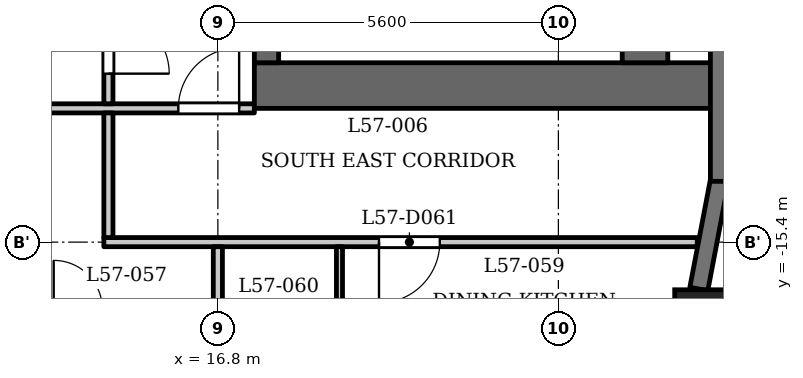
"""IFC4 building model, lengths in metres.
Left out: names, types, materials, properties, quantities, classifications, styles, units other than length and angle.
Written with IfcOpenShell. Run it as: python <this file> out.ifc"""

import sys

from ifc_helpers import new_model, si_unit, direction, frame, frame_2d, origin, origin_2d, place, context, subcontext, project, spatial, rectangle, extrude, element, fill, save


model = new_model("IFC4")
c1 = context("Model", 3, precision=1e-05, world=origin(), true_north=direction((0.0, 1.0)))
c2 = subcontext(c1, "Body", "Model", "MODEL_VIEW")
j1 = project(units=[si_unit("LENGTHUNIT", "METRE"), si_unit("PLANEANGLEUNIT", "RADIAN")], contexts=[c1])
p1 = place(None, origin())
s1 = spatial("IfcSite", under=j1, at=p1, CompositionType="ELEMENT")
p2 = place(p1, origin())
s2 = spatial("IfcBuilding", under=s1, at=p2, CompositionType="ELEMENT")
p3 = place(p2, frame((0.0, 0.0, 220.4)))
s3 = spatial("IfcBuildingStorey", under=s2, at=p3, CompositionType="ELEMENT", Elevation=220.4)
p4 = place(p3, frame((24.738, -16.609, 0.0), z_axis=(0.0, 0.0, 1.0), x_axis=(1.0, 0.0, 0.0)))
e1 = element("IfcColumn", 1, at=p4, inside=s3, PredefinedType="COLUMN", context=c2, shape_type="SweptSolid", body=[
    extrude(rectangle(XDim=0.85, YDim=0.85, at=origin_2d()), origin(), (0.0, 0.0, 1.0), 3.5),
])
p5 = place(p3, frame((24.709, -16.171, 0.0), z_axis=(0.0, 0.0, 1.0), x_axis=(0.187442908742, 0.982275499014, 0.0)))
e2 = element("IfcWall", 2, at=p5, inside=s3, PredefinedType="SOLIDWALL", context=c2, shape_type="SweptSolid", body=[
    extrude(rectangle(XDim=1.831, YDim=0.3, at=frame_2d((0.916, 0.0))), origin(), (0.0, 0.0, 1.0), 2.5),
])
p6 = place(p3, frame((25.05, -14.4, 0.0), z_axis=(0.0, 0.0, 1.0), x_axis=(0.0, 1.0, 0.0)))
e3 = element("IfcWall", 3, at=p6, inside=s3, PredefinedType="SOLIDWALL", context=c2, shape_type="SweptSolid", body=[
    extrude(rectangle(XDim=2.775, YDim=0.3, at=frame_2d((1.387, 0.0))), origin(), (0.0, 0.0, 1.0), 2.5),
])
p7 = place(p3, frame((17.4, -12.825, 0.0), z_axis=(0.0, 0.0, 1.0), x_axis=(1.0, 0.0, 0.0)))
e4 = element("IfcWall", 4, at=p7, inside=s3, PredefinedType="SHEAR", context=c2, shape_type="SweptSolid", body=[
    extrude(rectangle(XDim=7.6, YDim=0.75, at=frame_2d((3.8, 0.0))), origin(), (0.0, 0.0, 1.0), 3.2),
])
p8 = place(p3, frame((17.6, -12.45, 0.0), z_axis=(0.0, 0.0, 1.0), x_axis=(0.0, 1.0, 0.0)))
e5 = element("IfcWall", 5, at=p8, inside=s3, PredefinedType="SHEAR", context=c2, shape_type="SweptSolid", body=[
    extrude(rectangle(XDim=24.9, YDim=0.4, at=frame_2d((12.45, 0.0))), origin(), (0.0, 0.0, 1.0), 3.2),
])
p9 = place(p8, frame((6.85, 0.0, 0.0)))
e6 = element("IfcOpeningElement", 6, at=p9, cuts=e5, PredefinedType="OPENING", context=c2, shape_type="SweptSolid", body=[
    extrude(rectangle(XDim=0.9, YDim=2.1, at=frame_2d((0.45, 1.05))), frame((0.0, 0.21, 0.0), z_axis=(0.0, -1.0, 0.0), x_axis=(1.0, 0.0, 0.0)), (0.0, 0.0, 1.0), 0.42),
])
p10 = place(p8, frame((10.45, 0.0, 0.0)))
e7 = element("IfcOpeningElement", 7, at=p10, cuts=e5, PredefinedType="OPENING", context=c2, shape_type="SweptSolid", body=[
    extrude(rectangle(XDim=0.9, YDim=2.1, at=frame_2d((0.45, 1.05))), frame((0.0, 0.21, 0.0), z_axis=(0.0, -1.0, 0.0), x_axis=(1.0, 0.0, 0.0)), (0.0, 0.0, 1.0), 0.42),
])
p11 = place(p8, frame((15.6, 0.0, 0.0)))
e8 = element("IfcOpeningElement", 8, at=p11, cuts=e5, PredefinedType="OPENING", context=c2, shape_type="SweptSolid", body=[
    extrude(rectangle(XDim=1.1, YDim=2.1, at=frame_2d((0.55, 1.05))), frame((0.0, 0.21, 0.0), z_axis=(0.0, -1.0, 0.0), x_axis=(1.0, 0.0, 0.0)), (0.0, 0.0, 1.0), 0.42),
])
p12 = place(p8, frame((18.0, 0.0, 0.0)))
e9 = element("IfcOpeningElement", 9, at=p12, cuts=e5, PredefinedType="OPENING", context=c2, shape_type="SweptSolid", body=[
    extrude(rectangle(XDim=1.1, YDim=2.1, at=frame_2d((0.55, 1.05))), frame((0.0, 0.21, 0.0), z_axis=(0.0, -1.0, 0.0), x_axis=(1.0, 0.0, 0.0)), (0.0, 0.0, 1.0), 0.42),
])
p13 = place(p8, frame((23.025, 0.0, 0.0)))
e10 = element("IfcOpeningElement", 10, at=p13, cuts=e5, PredefinedType="OPENING", context=c2, shape_type="SweptSolid", body=[
    extrude(rectangle(XDim=1.1, YDim=2.1, at=frame_2d((0.55, 1.05))), frame((0.0, 0.21, 0.0), z_axis=(0.0, -1.0, 0.0), x_axis=(1.0, 0.0, 0.0)), (0.0, 0.0, 1.0), 0.42),
])
p14 = place(p8, frame((0.775, 0.0, 0.0)))
e11 = element("IfcOpeningElement", 11, at=p14, cuts=e5, PredefinedType="OPENING", context=c2, shape_type="SweptSolid", body=[
    extrude(rectangle(XDim=1.1, YDim=2.1, at=frame_2d((0.55, 1.05))), frame((0.0, 0.21, 0.0), z_axis=(0.0, -1.0, 0.0), x_axis=(1.0, 0.0, 0.0)), (0.0, 0.0, 1.0), 0.42),
])
p15 = place(p8, frame((12.925, 0.0, 0.0)))
e12 = element("IfcOpeningElement", 12, at=p15, cuts=e5, PredefinedType="OPENING", context=c2, shape_type="SweptSolid", body=[
    extrude(rectangle(XDim=1.8, YDim=2.1, at=frame_2d((0.9, 1.05))), frame((0.0, 0.21, 0.0), z_axis=(0.0, -1.0, 0.0), x_axis=(1.0, 0.0, 0.0)), (0.0, 0.0, 1.0), 0.42),
])
p16 = place(p3, frame((23.825, -12.45, 0.0), z_axis=(0.0, 0.0, 1.0), x_axis=(0.0, 1.0, 0.0)))
e13 = element("IfcWall", 13, at=p16, inside=s3, PredefinedType="SHEAR", context=c2, shape_type="SweptSolid", body=[
    extrude(rectangle(XDim=24.9, YDim=0.75, at=frame_2d((12.45, 0.0))), origin(), (0.0, 0.0, 1.0), 3.2),
])
p17 = place(p3, frame((14.925, -15.4, 0.0), z_axis=(0.0, 0.0, 1.0), x_axis=(1.0, 0.0, 0.0)))
e14 = element("IfcWall", 14, at=p17, inside=s3, PredefinedType="PARTITIONING", context=c2, shape_type="SweptSolid", body=[
    extrude(rectangle(XDim=9.759, YDim=0.15, at=frame_2d((4.879, 0.0))), origin(), (0.0, 0.0, 1.0), 3.2),
])
p18 = place(p17, frame((4.525, 0.0, 0.0)))
e15 = element("IfcOpeningElement", 15, at=p18, cuts=e14, PredefinedType="OPENING", context=c2, shape_type="SweptSolid", body=[
    extrude(rectangle(XDim=1.0, YDim=2.1, at=frame_2d((0.5, 1.05))), frame((0.0, 0.085, 0.0), z_axis=(0.0, -1.0, 0.0), x_axis=(1.0, 0.0, 0.0)), (0.0, 0.0, 1.0), 0.17),
])
p19 = place(p3, frame((-17.4, -13.2, 0.0), z_axis=(0.0, 0.0, 1.0), x_axis=(1.0, 0.0, 0.0)))
e16 = element("IfcWall", 16, at=p19, inside=s3, PredefinedType="PARTITIONING", context=c2, shape_type="SweptSolid", body=[
    extrude(rectangle(XDim=34.8, YDim=0.15, at=frame_2d((17.4, 0.0))), origin(), (0.0, 0.0, 1.0), 3.2),
])
p20 = place(p19, frame((0.15, 0.0, 0.0)))
e17 = element("IfcOpeningElement", 17, at=p20, cuts=e16, PredefinedType="OPENING", context=c2, shape_type="SweptSolid", body=[
    extrude(rectangle(XDim=1.0, YDim=2.1, at=frame_2d((0.5, 1.05))), frame((0.0, 0.085, 0.0), z_axis=(0.0, -1.0, 0.0), x_axis=(1.0, 0.0, 0.0)), (0.0, 0.0, 1.0), 0.17),
])
p21 = place(p19, frame((33.55, 0.0, 0.0)))
e18 = element("IfcOpeningElement", 18, at=p21, cuts=e16, PredefinedType="OPENING", context=c2, shape_type="SweptSolid", body=[
    extrude(rectangle(XDim=1.0, YDim=2.1, at=frame_2d((0.5, 1.05))), frame((0.0, 0.085, 0.0), z_axis=(0.0, -1.0, 0.0), x_axis=(1.0, 0.0, 0.0)), (0.0, 0.0, 1.0), 0.17),
])
p22 = place(p19, frame((3.7, 0.0, 0.0)))
e19 = element("IfcOpeningElement", 19, at=p22, cuts=e16, PredefinedType="OPENING", context=c2, shape_type="SweptSolid", body=[
    extrude(rectangle(XDim=1.0, YDim=2.1, at=frame_2d((0.5, 1.05))), frame((0.0, 0.085, 0.0), z_axis=(0.0, -1.0, 0.0), x_axis=(1.0, 0.0, 0.0)), (0.0, 0.0, 1.0), 0.17),
])
p23 = place(p19, frame((15.7, 0.0, 0.0)))
e20 = element("IfcOpeningElement", 20, at=p23, cuts=e16, PredefinedType="OPENING", context=c2, shape_type="SweptSolid", body=[
    extrude(rectangle(XDim=1.0, YDim=2.1, at=frame_2d((0.5, 1.05))), frame((0.0, 0.085, 0.0), z_axis=(0.0, -1.0, 0.0), x_axis=(1.0, 0.0, 0.0)), (0.0, 0.0, 1.0), 0.17),
])
p24 = place(p19, frame((21.3, 0.0, 0.0)))
e21 = element("IfcOpeningElement", 21, at=p24, cuts=e16, PredefinedType="OPENING", context=c2, shape_type="SweptSolid", body=[
    extrude(rectangle(XDim=1.0, YDim=2.1, at=frame_2d((0.5, 1.05))), frame((0.0, 0.085, 0.0), z_axis=(0.0, -1.0, 0.0), x_axis=(1.0, 0.0, 0.0)), (0.0, 0.0, 1.0), 0.17),
])
p25 = place(p19, frame((29.5, 0.0, 0.0)))
e22 = element("IfcOpeningElement", 22, at=p25, cuts=e16, PredefinedType="OPENING", context=c2, shape_type="SweptSolid", body=[
    extrude(rectangle(XDim=1.0, YDim=2.1, at=frame_2d((0.5, 1.05))), frame((0.0, 0.085, 0.0), z_axis=(0.0, -1.0, 0.0), x_axis=(1.0, 0.0, 0.0)), (0.0, 0.0, 1.0), 0.17),
])
p26 = place(p3, frame((15.0, -15.325, 0.0), z_axis=(0.0, 0.0, 1.0), x_axis=(0.0, 1.0, 0.0)))
e23 = element("IfcWall", 23, at=p26, inside=s3, PredefinedType="PARTITIONING", context=c2, shape_type="SweptSolid", body=[
    extrude(rectangle(XDim=2.05, YDim=0.15, at=frame_2d((1.025, 0.0))), origin(), (0.0, 0.0, 1.0), 3.2),
])
p27 = place(p3, frame((15.0, -13.125, 0.0), z_axis=(0.0, 0.0, 1.0), x_axis=(0.0, 1.0, 0.0)))
e24 = element("IfcWall", 24, at=p27, inside=s3, PredefinedType="PARTITIONING", context=c2, shape_type="SweptSolid", body=[
    extrude(rectangle(XDim=6.356, YDim=0.15, at=frame_2d((3.178, 0.0))), origin(), (0.0, 0.0, 1.0), 3.2),
])
p28 = place(p27, frame((0.496, 0.0, 0.0)))
e25 = element("IfcOpeningElement", 25, at=p28, cuts=e24, PredefinedType="OPENING", context=c2, shape_type="SweptSolid", body=[
    extrude(rectangle(XDim=1.0, YDim=2.1, at=frame_2d((0.5, 1.05))), frame((0.0, 0.085, 0.0), z_axis=(0.0, -1.0, 0.0), x_axis=(1.0, 0.0, 0.0)), (0.0, 0.0, 1.0), 0.17),
])
p29 = place(p3, frame((16.8, -22.31, 0.0), z_axis=(0.0, 0.0, 1.0), x_axis=(0.0, 1.0, 0.0)))
e26 = element("IfcWall", 26, at=p29, inside=s3, PredefinedType="PARTITIONING", context=c2, shape_type="SweptSolid", body=[
    extrude(rectangle(XDim=6.835, YDim=0.15, at=frame_2d((3.417, 0.0))), origin(), (0.0, 0.0, 1.0), 2.55),
])
p30 = place(p3, frame((18.8, -17.75, 0.0), z_axis=(0.0, 0.0, 1.0), x_axis=(0.0, 1.0, 0.0)))
e27 = element("IfcWall", 27, at=p30, inside=s3, PredefinedType="PARTITIONING", context=c2, shape_type="SweptSolid", body=[
    extrude(rectangle(XDim=2.275, YDim=0.1, at=frame_2d((1.137, 0.0))), origin(), (0.0, 0.0, 1.0), 3.2),
])
p31 = place(p28, origin())
e28 = element("IfcDoor", 28, at=p31, inside=s3, OperationType="SINGLE_SWING_LEFT", PredefinedType="DOOR", context=c2, shape_type="SweptSolid", body=[
    extrude(rectangle(XDim=1.0, YDim=2.1, at=frame_2d((0.5, 1.05))), frame((0.0, 0.025, 0.0), z_axis=(0.0, -1.0, 0.0), x_axis=(1.0, 0.0, 0.0)), (0.0, 0.0, 1.0), 0.05),
])
fill(e25, e28)
p32 = place(p21, origin())
e29 = element("IfcDoor", 29, at=p32, inside=s3, OperationType="SINGLE_SWING_LEFT", PredefinedType="DOOR", context=c2, shape_type="SweptSolid", body=[
    extrude(rectangle(XDim=1.0, YDim=2.1, at=frame_2d((0.5, 1.05))), frame((0.0, 0.025, 0.0), z_axis=(0.0, -1.0, 0.0), x_axis=(1.0, 0.0, 0.0)), (0.0, 0.0, 1.0), 0.05),
])
fill(e18, e29)
p33 = place(p18, origin())
e30 = element("IfcDoor", 30, at=p33, inside=s3, OperationType="SINGLE_SWING_LEFT", PredefinedType="DOOR", context=c2, shape_type="SweptSolid", body=[
    extrude(rectangle(XDim=1.0, YDim=2.1, at=frame_2d((0.5, 1.05))), frame((0.0, 0.025, 0.0), z_axis=(0.0, -1.0, 0.0), x_axis=(1.0, 0.0, 0.0)), (0.0, 0.0, 1.0), 0.05),
])
fill(e15, e30)
save(model, sys.argv[1])
